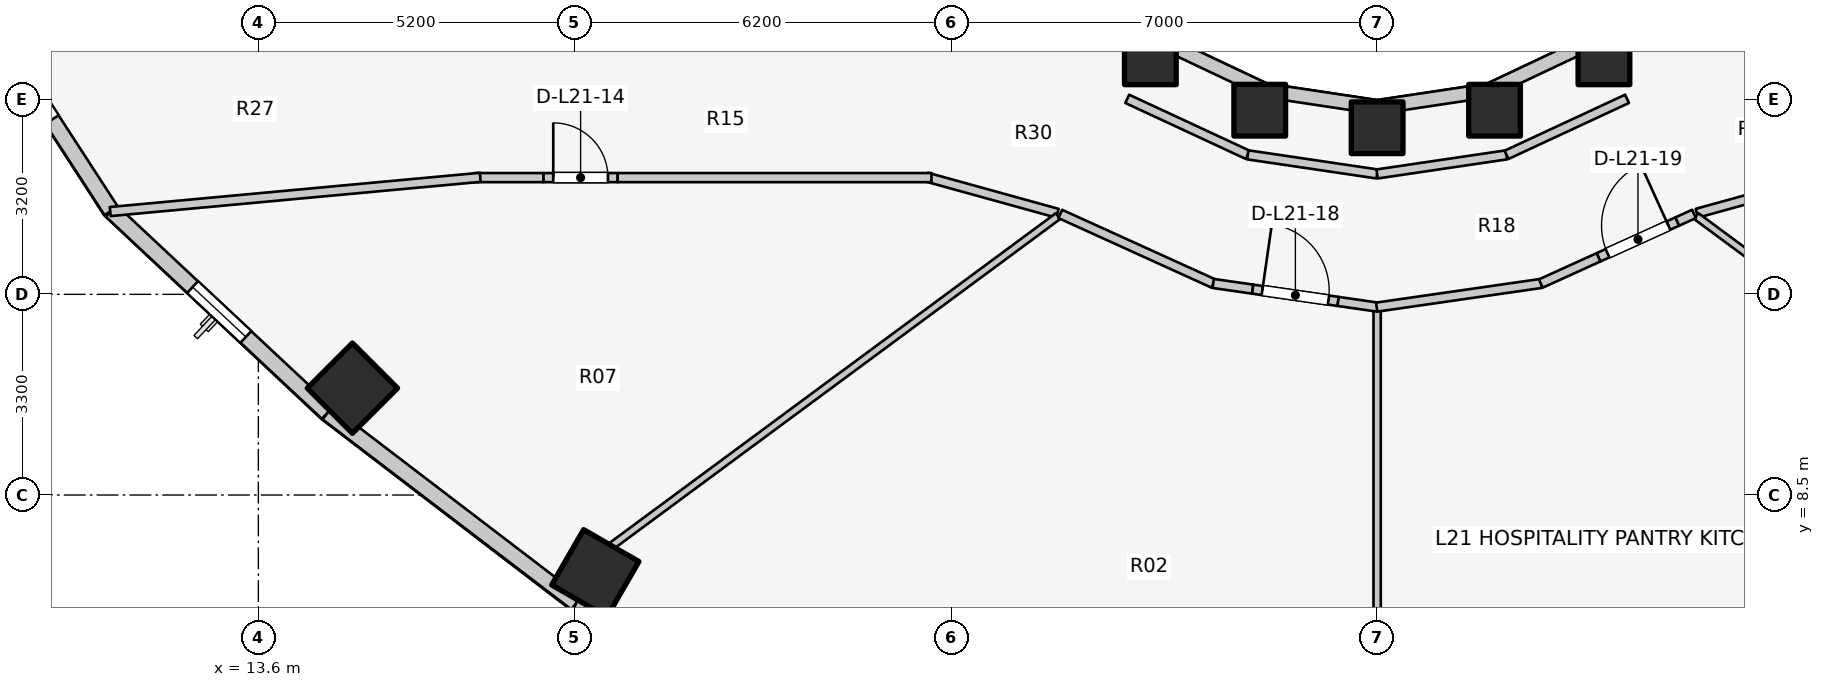
"""IFC4 building model, lengths in metres.
Left out: names, types, materials, properties, quantities, classifications, styles, units other than length and angle.
Written with IfcOpenShell. Run it as: python <this file> out.ifc"""

import sys

from ifc_helpers import new_model, si_unit, direction, frame, frame_2d, origin, origin_2d, place, context, subcontext, project, spatial, rectangle, extrude, element, fill, save


model = new_model("IFC4")
c1 = context("Model", 3, precision=1e-05, world=origin(), true_north=direction((0.0, 1.0)))
c2 = subcontext(c1, "Body", "Model", "MODEL_VIEW")
j1 = project(units=[si_unit("LENGTHUNIT", "METRE"), si_unit("PLANEANGLEUNIT", "RADIAN")], contexts=[c1])
p1 = place(None, origin())
s1 = spatial("IfcSite", under=j1, at=p1, CompositionType="ELEMENT")
p2 = place(p1, origin())
s2 = spatial("IfcBuilding", under=s1, at=p2, CompositionType="ELEMENT")
p3 = place(p2, frame((0.0, 0.0, 73.2)))
s3 = spatial("IfcBuildingStorey", under=s2, at=p3, CompositionType="ELEMENT", Elevation=73.2)
p4 = place(p3, frame((15.147, 10.257, 0.0), z_axis=(0.0, 0.0, 1.0), x_axis=(-0.707106781187, -0.707106781187, 0.0)))
e1 = element("IfcColumn", 1, at=p4, inside=s3, PredefinedType="COLUMN", context=c2, shape_type="SweptSolid", body=[
    extrude(rectangle(XDim=1.05, YDim=1.05, at=origin_2d()), origin(), (0.0, 0.0, 1.0), 3.1),
])
p5 = place(p3, frame((28.27, 15.673, 0.0), z_axis=(0.0, 0.0, 1.0), x_axis=(1.0, 0.0, 0.0)))
e2 = element("IfcColumn", 2, at=p5, inside=s3, PredefinedType="COLUMN", context=c2, shape_type="SweptSolid", body=[
    extrude(rectangle(XDim=0.85, YDim=0.85, at=origin_2d()), origin(), (0.0, 0.0, 1.0), 3.1),
])
p6 = place(p3, frame((19.142, 7.214, 0.0), z_axis=(0.0, 0.0, 1.0), x_axis=(-0.5, -0.866025403784, 0.0)))
e3 = element("IfcColumn", 3, at=p6, inside=s3, PredefinedType="COLUMN", context=c2, shape_type="SweptSolid", body=[
    extrude(rectangle(XDim=1.05, YDim=1.05, at=origin_2d()), origin(), (0.0, 0.0, 1.0), 3.1),
])
for number, where, z_axis, x_axis in (
    (4, (30.069, 14.828, 0.0), (0.0, 0.0, 1.0), (1.0, 0.0, 0.0)),
    (5, (32.0, 14.54, 0.0), (0.0, 0.0, 1.0), (1.0, 0.0, 0.0)),
    (6, (33.931, 14.828, 0.0), (0.0, 0.0, 1.0), (1.0, 0.0, 0.0)),
    (7, (35.73, 15.673, 0.0), (0.0, 0.0, 1.0), (1.0, 0.0, 0.0)),
):
    element("IfcColumn", number, at=place(p3, frame(where, z_axis=z_axis, x_axis=x_axis)), inside=s3, PredefinedType="COLUMN", context=c2, shape_type="SweptSolid", body=[
        extrude(rectangle(XDim=0.85, YDim=0.85, at=origin_2d()), origin(), (0.0, 0.0, 1.0), 3.1),
    ])
p7 = place(p3, frame((28.44, 15.968, 0.0), z_axis=(0.0, 0.0, 1.0), x_axis=(0.904179699603, -0.427152280606, 0.0)))
e8 = element("IfcWall", 8, at=p7, inside=s3, PredefinedType="STANDARD", context=c2, shape_type="SweptSolid", body=[
    extrude(rectangle(XDim=1.899, YDim=0.23, at=frame_2d((0.95, 0.0))), origin(), (0.0, 0.0, 1.0), 1.22),
])
for number, where, z_axis, x_axis in (
    (9, (30.157, 15.157, 0.0), (0.0, 0.0, 1.0), (0.989, -0.149, 0.0)),
    (10, (32.0, 14.88, 0.0), (0.0, 0.0, 1.0), (0.989, 0.149, 0.0)),
):
    element("IfcWall", number, at=place(p3, frame(where, z_axis=z_axis, x_axis=x_axis)), inside=s3, PredefinedType="STANDARD", context=c2, shape_type="SweptSolid", body=[
        extrude(rectangle(XDim=1.864, YDim=0.23, at=frame_2d((0.932, 0.0))), origin(), (0.0, 0.0, 1.0), 1.22),
    ])
p8 = place(p3, frame((33.843, 15.157, 0.0), z_axis=(0.0, 0.0, 1.0), x_axis=(0.904179699603, 0.427152280606, 0.0)))
e11 = element("IfcWall", 11, at=p8, inside=s3, PredefinedType="STANDARD", context=c2, shape_type="SweptSolid", body=[
    extrude(rectangle(XDim=1.899, YDim=0.23, at=frame_2d((0.95, 0.0))), origin(), (0.0, 0.0, 1.0), 1.22),
])
p9 = place(p3, frame((8.578, 17.181, 0.0), z_axis=(0.0, 0.0, 1.0), x_axis=(0.544388392991, -0.838833283541, 0.0)))
e12 = element("IfcWall", 12, at=p9, inside=s3, PredefinedType="STANDARD", context=c2, shape_type="SweptSolid", body=[
    extrude(rectangle(XDim=4.778, YDim=0.26, at=frame_2d((2.389, 0.0))), origin(), (0.0, 0.0, 1.0), 1.22),
])
p10 = place(p9, frame((1.789, 0.0, 0.15)))
e13 = element("IfcOpeningElement", 13, at=p10, cuts=e12, PredefinedType="OPENING", context=c2, shape_type="SweptSolid", body=[
    extrude(rectangle(XDim=1.2, YDim=0.9, at=frame_2d((0.6, 0.45))), frame((0.0, 0.14, 0.0), z_axis=(0.0, -1.0, 0.0), x_axis=(1.0, 0.0, 0.0)), (0.0, 0.0, 1.0), 0.28),
])
p11 = place(p3, frame((11.179, 13.173, 0.0), z_axis=(0.0, 0.0, 1.0), x_axis=(0.730162452258, -0.68327358599, 0.0)))
e14 = element("IfcWall", 14, at=p11, inside=s3, PredefinedType="STANDARD", context=c2, shape_type="SweptSolid", body=[
    extrude(rectangle(XDim=4.868, YDim=0.26, at=frame_2d((2.434, 0.0))), origin(), (0.0, 0.0, 1.0), 1.22),
])
p12 = place(p11, frame((1.834, 0.0, 0.15)))
e15 = element("IfcOpeningElement", 15, at=p12, cuts=e14, PredefinedType="OPENING", context=c2, shape_type="SweptSolid", body=[
    extrude(rectangle(XDim=1.2, YDim=0.9, at=frame_2d((0.6, 0.45))), frame((0.0, 0.14, 0.0), z_axis=(0.0, -1.0, 0.0), x_axis=(1.0, 0.0, 0.0)), (0.0, 0.0, 1.0), 0.28),
])
p13 = place(p3, frame((14.734, 9.847, 0.0), z_axis=(0.0, 0.0, 1.0), x_axis=(0.794809810864, -0.606858603427, 0.0)))
e16 = element("IfcWall", 16, at=p13, inside=s3, PredefinedType="STANDARD", context=c2, shape_type="SweptSolid", body=[
    extrude(rectangle(XDim=5.149, YDim=0.26, at=frame_2d((2.575, 0.0))), origin(), (0.0, 0.0, 1.0), 1.22),
])
p14 = place(p3, frame((18.827, 6.722, 0.0), z_axis=(0.0, 0.0, 1.0), x_axis=(0.914336605747, -0.404955023911, 0.0)))
e17 = element("IfcWall", 17, at=p14, inside=s3, PredefinedType="STANDARD", context=c2, shape_type="SweptSolid", body=[
    extrude(rectangle(XDim=5.859, YDim=0.26, at=frame_2d((2.929, 0.0))), origin(), (0.0, 0.0, 1.0), 1.22),
])
p15 = place(p14, frame((2.329, 0.0, 0.15)))
e18 = element("IfcOpeningElement", 18, at=p15, cuts=e17, PredefinedType="OPENING", context=c2, shape_type="SweptSolid", body=[
    extrude(rectangle(XDim=1.2, YDim=0.9, at=frame_2d((0.6, 0.45))), frame((0.0, 0.14, 0.0), z_axis=(0.0, -1.0, 0.0), x_axis=(1.0, 0.0, 0.0)), (0.0, 0.0, 1.0), 0.28),
])
p16 = place(p3, frame((27.89, 15.015, 0.0), z_axis=(0.0, 0.0, 1.0), x_axis=(0.906943449489, -0.421252393975, 0.0)))
e19 = element("IfcWall", 19, at=p16, inside=s3, PredefinedType="PARTITIONING", context=c2, shape_type="SweptSolid", body=[
    extrude(rectangle(XDim=2.186, YDim=0.15, at=frame_2d((1.093, 0.0))), origin(), (0.0, 0.0, 1.0), 1.22),
])
for number, where, z_axis, x_axis in (
    (20, (29.873, 14.094, 0.0), (0.0, 0.0, 1.0), (0.989, -0.146, 0.0)),
    (21, (32.0, 13.78, 0.0), (0.0, 0.0, 1.0), (0.989, 0.146, 0.0)),
):
    element("IfcWall", number, at=place(p3, frame(where, z_axis=z_axis, x_axis=x_axis)), inside=s3, PredefinedType="PARTITIONING", context=c2, shape_type="SweptSolid", body=[
        extrude(rectangle(XDim=2.151, YDim=0.15, at=frame_2d((1.075, 0.0))), origin(), (0.0, 0.0, 1.0), 1.22),
    ])
p17 = place(p3, frame((34.127, 14.094, 0.0), z_axis=(0.0, 0.0, 1.0), x_axis=(0.906943449489, 0.421252393975, 0.0)))
e22 = element("IfcWall", 22, at=p17, inside=s3, PredefinedType="PARTITIONING", context=c2, shape_type="SweptSolid", body=[
    extrude(rectangle(XDim=2.186, YDim=0.15, at=frame_2d((1.093, 0.0))), origin(), (0.0, 0.0, 1.0), 1.22),
])
p18 = place(p3, frame((26.742, 13.133, 0.0), z_axis=(0.0, 0.0, 1.0), x_axis=(-0.963833843713, 0.266503886865, 0.0)))
e23 = element("IfcWall", 23, at=p18, inside=s3, PredefinedType="PARTITIONING", context=c2, shape_type="SweptSolid", body=[
    extrude(rectangle(XDim=2.232, YDim=0.15, at=frame_2d((1.116, 0.0))), origin(), (0.0, 0.0, 1.0), 1.22),
])
p19 = place(p3, frame((17.15, 13.72, 0.0), z_axis=(0.0, 0.0, 1.0), x_axis=(1.0, 0.0, 0.0)))
e24 = element("IfcWall", 24, at=p19, inside=s3, PredefinedType="PARTITIONING", context=c2, shape_type="SweptSolid", body=[
    extrude(rectangle(XDim=1.14, YDim=0.15, at=frame_2d((0.57, 0.0))), origin(), (0.0, 0.0, 1.0), 2.575),
])
p20 = place(p3, frame((18.29, 13.72, 0.0), z_axis=(0.0, 0.0, 1.0), x_axis=(1.0, 0.0, 0.0)))
e25 = element("IfcWall", 25, at=p20, inside=s3, PredefinedType="PARTITIONING", context=c2, shape_type="SweptSolid", body=[
    extrude(rectangle(XDim=1.22, YDim=0.15, at=frame_2d((0.61, 0.0))), origin(), (0.0, 0.0, 1.0), 2.575),
])
p21 = place(p20, frame((0.16, 0.0, 0.0)))
e26 = element("IfcOpeningElement", 26, at=p21, cuts=e25, PredefinedType="OPENING", context=c2, shape_type="SweptSolid", body=[
    extrude(rectangle(XDim=0.9, YDim=2.1, at=frame_2d((0.45, 1.05))), frame((0.0, 0.085, 0.0), z_axis=(0.0, -1.0, 0.0), x_axis=(1.0, 0.0, 0.0)), (0.0, 0.0, 1.0), 0.17),
])
p22 = place(p3, frame((19.51, 13.72, 0.0), z_axis=(0.0, 0.0, 1.0), x_axis=(1.0, 0.0, 0.0)))
e27 = element("IfcWall", 27, at=p22, inside=s3, PredefinedType="PARTITIONING", context=c2, shape_type="SweptSolid", body=[
    extrude(rectangle(XDim=5.16, YDim=0.15, at=frame_2d((2.58, 0.0))), origin(), (0.0, 0.0, 1.0), 1.22),
])
p23 = place(p3, frame((17.25, 13.725, 0.0), z_axis=(0.0, 0.0, 1.0), x_axis=(-0.995748209098, -0.092116795851, 0.0)))
e28 = element("IfcWall", 28, at=p23, inside=s3, PredefinedType="PARTITIONING", context=c2, shape_type="SweptSolid", body=[
    extrude(rectangle(XDim=6.112, YDim=0.15, at=frame_2d((3.056, 0.0))), origin(), (0.0, 0.0, 1.0), 1.22),
])
p24 = place(p3, frame((37.258, 13.133, 0.0), z_axis=(0.0, 0.0, 1.0), x_axis=(0.963833843713, 0.266503886865, 0.0)))
e29 = element("IfcWall", 29, at=p24, inside=s3, PredefinedType="PARTITIONING", context=c2, shape_type="SweptSolid", body=[
    extrude(rectangle(XDim=2.232, YDim=0.15, at=frame_2d((1.116, 0.0))), origin(), (0.0, 0.0, 1.0), 1.22),
])
p25 = place(p3, frame((26.751, 13.086, 0.0), z_axis=(0.0, 0.0, 1.0), x_axis=(-0.80430981394, -0.594210167533, 0.0)))
e30 = element("IfcWall", 30, at=p25, inside=s3, PredefinedType="MOVABLE", context=c2, shape_type="SweptSolid", body=[
    extrude(rectangle(XDim=9.146, YDim=0.12, at=frame_2d((4.573, 0.0))), origin(), (0.0, 0.0, 1.0), 1.22),
])
p26 = place(p3, frame((32.0, 11.535, 0.0), z_axis=(0.0, 0.0, 1.0), x_axis=(0.0, -1.0, 0.0)))
e31 = element("IfcWall", 31, at=p26, inside=s3, PredefinedType="MOVABLE", context=c2, shape_type="SweptSolid", body=[
    extrude(rectangle(XDim=6.91, YDim=0.12, at=frame_2d((3.455, 0.0))), origin(), (0.0, 0.0, 1.0), 1.22),
])
p27 = place(p3, frame((37.249, 13.086, 0.0), z_axis=(0.0, 0.0, 1.0), x_axis=(0.80430981394, -0.594210167533, 0.0)))
e32 = element("IfcWall", 32, at=p27, inside=s3, PredefinedType="MOVABLE", context=c2, shape_type="SweptSolid", body=[
    extrude(rectangle(XDim=9.146, YDim=0.12, at=frame_2d((4.573, 0.0))), origin(), (0.0, 0.0, 1.0), 1.22),
])
p28 = place(p3, frame((26.789, 13.123, 0.0), z_axis=(0.0, 0.0, 1.0), x_axis=(0.910435980343, -0.413650003865, 0.0)))
e33 = element("IfcWall", 33, at=p28, inside=s3, PredefinedType="PARTITIONING", context=c2, shape_type="SweptSolid", body=[
    extrude(rectangle(XDim=2.766, YDim=0.15, at=frame_2d((1.383, 0.0))), origin(), (0.0, 0.0, 1.0), 1.22),
])
p29 = place(p3, frame((29.304, 11.979, 0.0), z_axis=(0.0, 0.0, 1.0), x_axis=(0.989829975321, -0.142255474256, 0.0)))
e34 = element("IfcWall", 34, at=p29, inside=s3, PredefinedType="PARTITIONING", context=c2, shape_type="SweptSolid", body=[
    extrude(rectangle(XDim=0.656, YDim=0.15, at=frame_2d((0.328, 0.0))), origin(), (0.0, 0.0, 1.0), 2.575),
])
p30 = place(p3, frame((29.953, 11.886, 0.0), z_axis=(0.0, 0.0, 1.0), x_axis=(0.98979070052, -0.142528485449, 0.0)))
e35 = element("IfcWall", 35, at=p30, inside=s3, PredefinedType="PARTITIONING", context=c2, shape_type="SweptSolid", body=[
    extrude(rectangle(XDim=1.42, YDim=0.15, at=frame_2d((0.71, 0.0))), origin(), (0.0, 0.0, 1.0), 2.575),
])
p31 = place(p30, frame((0.16, 0.0, 0.0)))
e36 = element("IfcOpeningElement", 36, at=p31, cuts=e35, PredefinedType="OPENING", context=c2, shape_type="SweptSolid", body=[
    extrude(rectangle(XDim=1.1, YDim=2.1, at=frame_2d((0.55, 1.05))), frame((0.0, 0.085, 0.0), z_axis=(0.0, -1.0, 0.0), x_axis=(1.0, 0.0, 0.0)), (0.0, 0.0, 1.0), 0.17),
])
p32 = place(p3, frame((31.358, 11.684, 0.0), z_axis=(0.0, 0.0, 1.0), x_axis=(0.989777474181, -0.142620305723, 0.0)))
e37 = element("IfcWall", 37, at=p32, inside=s3, PredefinedType="PARTITIONING", context=c2, shape_type="SweptSolid", body=[
    extrude(rectangle(XDim=0.656, YDim=0.15, at=frame_2d((0.328, 0.0))), origin(), (0.0, 0.0, 1.0), 1.22),
])
p33 = place(p3, frame((31.993, 11.59, 0.0), z_axis=(0.0, 0.0, 1.0), x_axis=(0.989796962007, 0.142484995705, 0.0)))
e38 = element("IfcWall", 38, at=p33, inside=s3, PredefinedType="PARTITIONING", context=c2, shape_type="SweptSolid", body=[
    extrude(rectangle(XDim=2.731, YDim=0.15, at=frame_2d((1.366, 0.0))), origin(), (0.0, 0.0, 1.0), 1.22),
])
p34 = place(p3, frame((34.693, 11.978, 0.0), z_axis=(0.0, 0.0, 1.0), x_axis=(0.910454535794, 0.413609161228, 0.0)))
e39 = element("IfcWall", 39, at=p34, inside=s3, PredefinedType="PARTITIONING", context=c2, shape_type="SweptSolid", body=[
    extrude(rectangle(XDim=1.044, YDim=0.15, at=frame_2d((0.522, 0.0))), origin(), (0.0, 0.0, 1.0), 1.22),
])
p35 = place(p3, frame((35.643, 12.41, 0.0), z_axis=(0.0, 0.0, 1.0), x_axis=(0.910419465037, 0.413686351819, 0.0)))
e40 = element("IfcWall", 40, at=p35, inside=s3, PredefinedType="PARTITIONING", context=c2, shape_type="SweptSolid", body=[
    extrude(rectangle(XDim=1.42, YDim=0.15, at=frame_2d((0.71, 0.0))), origin(), (0.0, 0.0, 1.0), 2.16),
])
p36 = place(p35, frame((0.16, 0.0, 0.0)))
e41 = element("IfcOpeningElement", 41, at=p36, cuts=e40, PredefinedType="OPENING", context=c2, shape_type="SweptSolid", body=[
    extrude(rectangle(XDim=1.1, YDim=2.1, at=frame_2d((0.55, 1.05))), frame((0.0, 0.085, 0.0), z_axis=(0.0, -1.0, 0.0), x_axis=(1.0, 0.0, 0.0)), (0.0, 0.0, 1.0), 0.17),
])
p37 = place(p3, frame((36.936, 12.998, 0.0), z_axis=(0.0, 0.0, 1.0), x_axis=(0.910449457667, 0.413620339242, 0.0)))
e42 = element("IfcWall", 42, at=p37, inside=s3, PredefinedType="PARTITIONING", context=c2, shape_type="SweptSolid", body=[
    extrude(rectangle(XDim=0.302, YDim=0.15, at=frame_2d((0.151, 0.0))), origin(), (0.0, 0.0, 1.0), 2.575),
])
p38 = place(p10, origin())
e43 = element("IfcWindow", 43, at=p38, inside=s3, PartitioningType="SINGLE_PANEL", PredefinedType="WINDOW", context=c2, shape_type="SweptSolid", body=[
    extrude(rectangle(XDim=1.2, YDim=0.9, at=frame_2d((0.6, 0.45))), frame((0.0, 0.03, 0.0), z_axis=(0.0, -1.0, 0.0), x_axis=(1.0, 0.0, 0.0)), (0.0, 0.0, 1.0), 0.06),
])
fill(e13, e43)
p39 = place(p12, origin())
e44 = element("IfcWindow", 44, at=p39, inside=s3, PartitioningType="SINGLE_PANEL", PredefinedType="WINDOW", context=c2, shape_type="SweptSolid", body=[
    extrude(rectangle(XDim=1.2, YDim=0.9, at=frame_2d((0.6, 0.45))), frame((0.0, 0.03, 0.0), z_axis=(0.0, -1.0, 0.0), x_axis=(1.0, 0.0, 0.0)), (0.0, 0.0, 1.0), 0.06),
])
fill(e15, e44)
p40 = place(p21, origin())
e45 = element("IfcDoor", 45, at=p40, inside=s3, OperationType="SINGLE_SWING_LEFT", PredefinedType="DOOR", context=c2, shape_type="SweptSolid", body=[
    extrude(rectangle(XDim=0.9, YDim=2.1, at=frame_2d((0.45, 1.05))), frame((0.0, 0.025, 0.0), z_axis=(0.0, -1.0, 0.0), x_axis=(1.0, 0.0, 0.0)), (0.0, 0.0, 1.0), 0.05),
])
fill(e26, e45)
p41 = place(p31, origin())
e46 = element("IfcDoor", 46, at=p41, inside=s3, OperationType="SINGLE_SWING_LEFT", PredefinedType="DOOR", context=c2, shape_type="SweptSolid", body=[
    extrude(rectangle(XDim=1.1, YDim=2.1, at=frame_2d((0.55, 1.05))), frame((0.0, 0.025, 0.0), z_axis=(0.0, -1.0, 0.0), x_axis=(1.0, 0.0, 0.0)), (0.0, 0.0, 1.0), 0.05),
])
fill(e36, e46)
p42 = place(p36, origin())
e47 = element("IfcDoor", 47, at=p42, inside=s3, OperationType="SINGLE_SWING_RIGHT", PredefinedType="DOOR", context=c2, shape_type="SweptSolid", body=[
    extrude(rectangle(XDim=1.1, YDim=2.1, at=frame_2d((0.55, 1.05))), frame((0.0, 0.025, 0.0), z_axis=(0.0, -1.0, 0.0), x_axis=(1.0, 0.0, 0.0)), (0.0, 0.0, 1.0), 0.05),
])
fill(e41, e47)
save(model, sys.argv[1])
